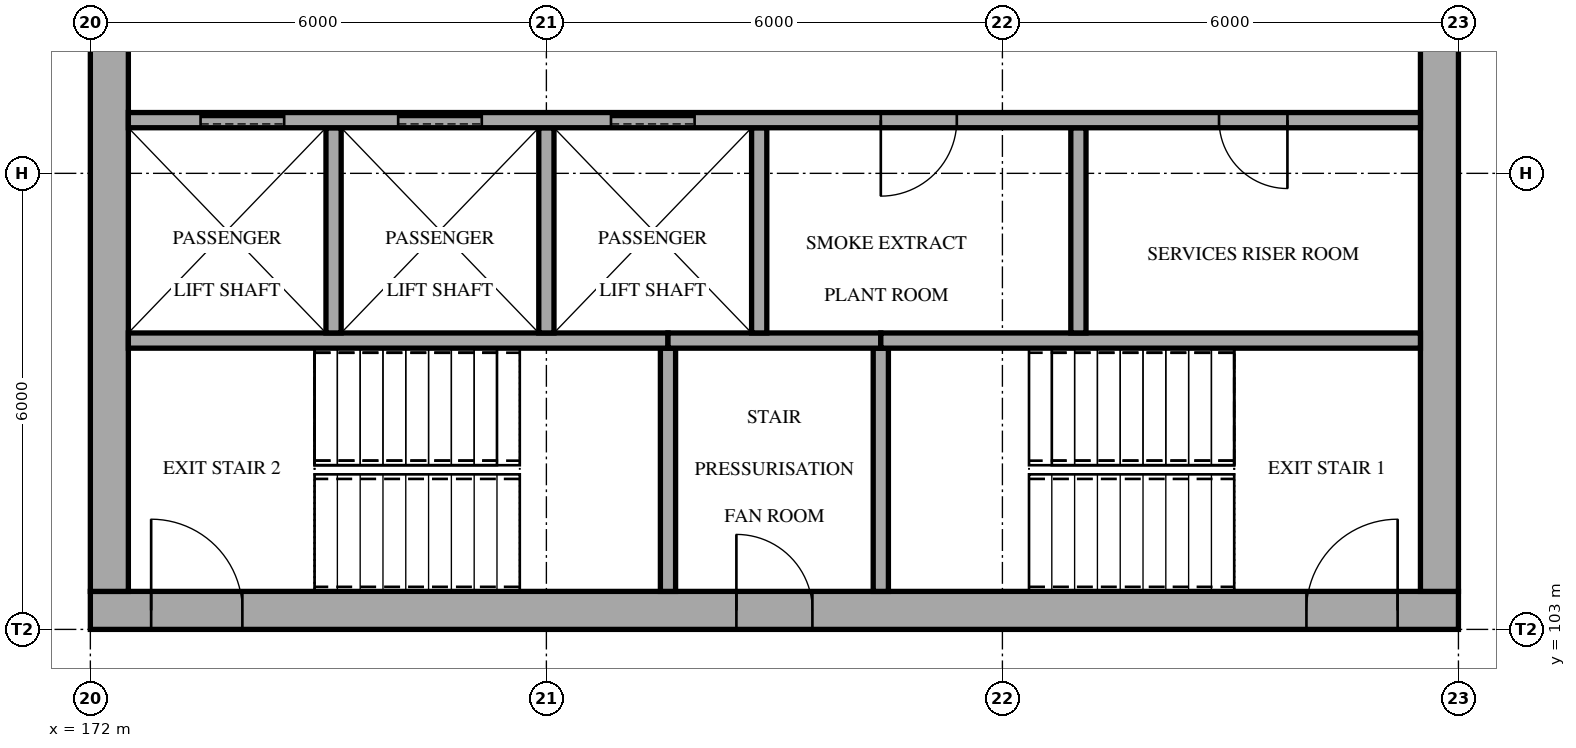
"""IFC4 building model, lengths in metres.
Left out: names, types, materials, properties, quantities, classifications, styles, units other than length and angle.
Written with IfcOpenShell. Run it as: python <this file> out.ifc"""

import sys

from ifc_helpers import new_model, si_unit, direction, frame, frame_2d, origin, place, context, subcontext, project, spatial, rectangle, extrude, element, fill, save


model = new_model("IFC4")
c1 = context("Model", 3, precision=1e-05, world=origin(), true_north=direction((0.0, 1.0)))
c2 = subcontext(c1, "Body", "Model", "MODEL_VIEW")
j1 = project(units=[si_unit("LENGTHUNIT", "METRE"), si_unit("PLANEANGLEUNIT", "RADIAN")], contexts=[c1])
p1 = place(None, origin())
s1 = spatial("IfcSite", under=j1, at=p1, CompositionType="ELEMENT")
p2 = place(p1, origin())
s2 = spatial("IfcBuilding", under=s1, at=p2, CompositionType="ELEMENT")
p3 = place(p2, frame((0.0, 0.0, -4.2)))
s3 = spatial("IfcBuildingStorey", under=s2, at=p3, CompositionType="ELEMENT", Elevation=-4.2)
p4 = place(p3, frame((172.0, 103.25, 0.0), z_axis=(0.0, 0.0, 1.0), x_axis=(1.0, 0.0, 0.0)))
e1 = element("IfcWall", 1, at=p4, inside=s3, PredefinedType="SHEAR", context=c2, shape_type="SweptSolid", body=[
    extrude(rectangle(XDim=18.0, YDim=0.5, at=frame_2d((9.0, 0.0))), origin(), (0.0, 0.0, 1.0), 4.2),
])
p5 = place(p4, frame((8.5, 0.0, 0.0)))
e2 = element("IfcOpeningElement", 2, at=p5, cuts=e1, PredefinedType="OPENING", context=c2, shape_type="SweptSolid", body=[
    extrude(rectangle(XDim=1.0, YDim=2.1, at=frame_2d((0.5, 1.05))), frame((0.0, 0.26, 0.0), z_axis=(0.0, -1.0, 0.0), x_axis=(1.0, 0.0, 0.0)), (0.0, 0.0, 1.0), 0.52),
])
p6 = place(p4, frame((0.8, 0.0, 0.0)))
e3 = element("IfcOpeningElement", 3, at=p6, cuts=e1, PredefinedType="OPENING", context=c2, shape_type="SweptSolid", body=[
    extrude(rectangle(XDim=1.2, YDim=2.1, at=frame_2d((0.6, 1.05))), frame((0.0, 0.26, 0.0), z_axis=(0.0, -1.0, 0.0), x_axis=(1.0, 0.0, 0.0)), (0.0, 0.0, 1.0), 0.52),
])
p7 = place(p4, frame((16.0, 0.0, 0.0)))
e4 = element("IfcOpeningElement", 4, at=p7, cuts=e1, PredefinedType="OPENING", context=c2, shape_type="SweptSolid", body=[
    extrude(rectangle(XDim=1.2, YDim=2.1, at=frame_2d((0.6, 1.05))), frame((0.0, 0.26, 0.0), z_axis=(0.0, -1.0, 0.0), x_axis=(1.0, 0.0, 0.0)), (0.0, 0.0, 1.0), 0.52),
])
p8 = place(p3, frame((172.25, 103.5, 0.0), z_axis=(0.0, 0.0, 1.0), x_axis=(0.0, 1.0, 0.0)))
e5 = element("IfcWall", 5, at=p8, inside=s3, PredefinedType="SHEAR", context=c2, shape_type="SweptSolid", body=[
    extrude(rectangle(XDim=17.0, YDim=0.5, at=frame_2d((8.5, 0.0))), origin(), (0.0, 0.0, 1.0), 4.2),
])
p9 = place(p8, frame((7.2, 0.0, 0.0)))
e6 = element("IfcOpeningElement", 6, at=p9, cuts=e5, PredefinedType="OPENING", context=c2, shape_type="SweptSolid", body=[
    extrude(rectangle(XDim=1.4, YDim=2.1, at=frame_2d((0.7, 1.05))), frame((0.0, 0.26, 0.0), z_axis=(0.0, -1.0, 0.0), x_axis=(1.0, 0.0, 0.0)), (0.0, 0.0, 1.0), 0.52),
])
p10 = place(p3, frame((189.75, 103.5, 0.0), z_axis=(0.0, 0.0, 1.0), x_axis=(0.0, 1.0, 0.0)))
e7 = element("IfcWall", 7, at=p10, inside=s3, PredefinedType="SHEAR", context=c2, shape_type="SweptSolid", body=[
    extrude(rectangle(XDim=17.0, YDim=0.5, at=frame_2d((8.5, 0.0))), origin(), (0.0, 0.0, 1.0), 4.2),
])
p11 = place(p10, frame((7.2, 0.0, 0.0)))
e8 = element("IfcOpeningElement", 8, at=p11, cuts=e7, PredefinedType="OPENING", context=c2, shape_type="SweptSolid", body=[
    extrude(rectangle(XDim=1.4, YDim=2.1, at=frame_2d((0.7, 1.05))), frame((0.0, 0.26, 0.0), z_axis=(0.0, -1.0, 0.0), x_axis=(1.0, 0.0, 0.0)), (0.0, 0.0, 1.0), 0.52),
])
for number, where, z_axis, x_axis in (
    (9, (179.6, 103.5, 0.0), (0.0, 0.0, 1.0), (0.0, 1.0, 0.0)),
    (10, (182.4, 103.5, 0.0), (0.0, 0.0, 1.0), (0.0, 1.0, 0.0)),
):
    element("IfcWall", number, at=place(p3, frame(where, z_axis=z_axis, x_axis=x_axis)), inside=s3, PredefinedType="SOLIDWALL", context=c2, shape_type="SweptSolid", body=[
        extrude(rectangle(XDim=3.2, YDim=0.2, at=frame_2d((1.6, 0.0))), origin(), (0.0, 0.0, 1.0), 4.0),
    ])
p12 = place(p3, frame((172.5, 106.8, 0.0), z_axis=(0.0, 0.0, 1.0), x_axis=(1.0, 0.0, 0.0)))
e11 = element("IfcWall", 11, at=p12, inside=s3, PredefinedType="SOLIDWALL", context=c2, shape_type="SweptSolid", body=[
    extrude(rectangle(XDim=7.1, YDim=0.2, at=frame_2d((3.55, 0.0))), origin(), (0.0, 0.0, 1.0), 4.0),
])
p13 = place(p3, frame((179.6, 106.8, 0.0), z_axis=(0.0, 0.0, 1.0), x_axis=(1.0, 0.0, 0.0)))
e12 = element("IfcWall", 12, at=p13, inside=s3, PredefinedType="SOLIDWALL", context=c2, shape_type="SweptSolid", body=[
    extrude(rectangle(XDim=2.8, YDim=0.2, at=frame_2d((1.4, 0.0))), origin(), (0.0, 0.0, 1.0), 4.0),
])
p14 = place(p3, frame((182.4, 106.8, 0.0), z_axis=(0.0, 0.0, 1.0), x_axis=(1.0, 0.0, 0.0)))
e13 = element("IfcWall", 13, at=p14, inside=s3, PredefinedType="SOLIDWALL", context=c2, shape_type="SweptSolid", body=[
    extrude(rectangle(XDim=7.1, YDim=0.2, at=frame_2d((3.55, 0.0))), origin(), (0.0, 0.0, 1.0), 4.0),
])
for number, where, z_axis, x_axis in (
    (14, (175.2, 106.9, 0.0), (0.0, 0.0, 1.0), (0.0, 1.0, 0.0)),
    (15, (178.0, 106.9, 0.0), (0.0, 0.0, 1.0), (0.0, 1.0, 0.0)),
    (16, (180.8, 106.9, 0.0), (0.0, 0.0, 1.0), (0.0, 1.0, 0.0)),
    (17, (185.0, 106.9, 0.0), (0.0, 0.0, 1.0), (0.0, 1.0, 0.0)),
):
    element("IfcWall", number, at=place(p3, frame(where, z_axis=z_axis, x_axis=x_axis)), inside=s3, PredefinedType="SOLIDWALL", context=c2, shape_type="SweptSolid", body=[
        extrude(rectangle(XDim=2.7, YDim=0.2, at=frame_2d((1.35, 0.0))), origin(), (0.0, 0.0, 1.0), 4.0),
    ])
p15 = place(p3, frame((172.5, 109.7, 0.0), z_axis=(0.0, 0.0, 1.0), x_axis=(1.0, 0.0, 0.0)))
e18 = element("IfcWall", 18, at=p15, inside=s3, PredefinedType="SOLIDWALL", context=c2, shape_type="SweptSolid", body=[
    extrude(rectangle(XDim=17.0, YDim=0.2, at=frame_2d((8.5, 0.0))), origin(), (0.0, 0.0, 1.0), 4.0),
])
p16 = place(p15, frame((0.95, 0.0, 0.0)))
e19 = element("IfcOpeningElement", 19, at=p16, cuts=e18, PredefinedType="OPENING", context=c2, shape_type="SweptSolid", body=[
    extrude(rectangle(XDim=1.1, YDim=2.1, at=frame_2d((0.55, 1.05))), frame((0.0, 0.11, 0.0), z_axis=(0.0, -1.0, 0.0), x_axis=(1.0, 0.0, 0.0)), (0.0, 0.0, 1.0), 0.22),
])
p17 = place(p15, frame((3.55, 0.0, 0.0)))
e20 = element("IfcOpeningElement", 20, at=p17, cuts=e18, PredefinedType="OPENING", context=c2, shape_type="SweptSolid", body=[
    extrude(rectangle(XDim=1.1, YDim=2.1, at=frame_2d((0.55, 1.05))), frame((0.0, 0.11, 0.0), z_axis=(0.0, -1.0, 0.0), x_axis=(1.0, 0.0, 0.0)), (0.0, 0.0, 1.0), 0.22),
])
p18 = place(p15, frame((6.35, 0.0, 0.0)))
e21 = element("IfcOpeningElement", 21, at=p18, cuts=e18, PredefinedType="OPENING", context=c2, shape_type="SweptSolid", body=[
    extrude(rectangle(XDim=1.1, YDim=2.1, at=frame_2d((0.55, 1.05))), frame((0.0, 0.11, 0.0), z_axis=(0.0, -1.0, 0.0), x_axis=(1.0, 0.0, 0.0)), (0.0, 0.0, 1.0), 0.22),
])
p19 = place(p15, frame((9.9, 0.0, 0.0)))
e22 = element("IfcOpeningElement", 22, at=p19, cuts=e18, PredefinedType="OPENING", context=c2, shape_type="SweptSolid", body=[
    extrude(rectangle(XDim=1.0, YDim=2.1, at=frame_2d((0.5, 1.05))), frame((0.0, 0.11, 0.0), z_axis=(0.0, -1.0, 0.0), x_axis=(1.0, 0.0, 0.0)), (0.0, 0.0, 1.0), 0.22),
])
p20 = place(p15, frame((14.35, 0.0, 0.0)))
e23 = element("IfcOpeningElement", 23, at=p20, cuts=e18, PredefinedType="OPENING", context=c2, shape_type="SweptSolid", body=[
    extrude(rectangle(XDim=0.9, YDim=2.1, at=frame_2d((0.45, 1.05))), frame((0.0, 0.11, 0.0), z_axis=(0.0, -1.0, 0.0), x_axis=(1.0, 0.0, 0.0)), (0.0, 0.0, 1.0), 0.22),
])
p21 = place(p5, origin())
e24 = element("IfcDoor", 24, at=p21, inside=s3, OperationType="SINGLE_SWING_LEFT", PredefinedType="DOOR", context=c2, shape_type="SweptSolid", body=[
    extrude(rectangle(XDim=1.0, YDim=2.1, at=frame_2d((0.5, 1.05))), frame((0.0, 0.025, 0.0), z_axis=(0.0, -1.0, 0.0), x_axis=(1.0, 0.0, 0.0)), (0.0, 0.0, 1.0), 0.05),
])
fill(e2, e24)
p22 = place(p16, origin())
e25 = element("IfcDoor", 25, at=p22, inside=s3, OperationType="SLIDING_TO_LEFT", PredefinedType="DOOR", context=c2, shape_type="SweptSolid", body=[
    extrude(rectangle(XDim=1.1, YDim=2.1, at=frame_2d((0.55, 1.05))), frame((0.0, 0.025, 0.0), z_axis=(0.0, -1.0, 0.0), x_axis=(1.0, 0.0, 0.0)), (0.0, 0.0, 1.0), 0.05),
])
fill(e19, e25)
p23 = place(p17, origin())
e26 = element("IfcDoor", 26, at=p23, inside=s3, OperationType="SLIDING_TO_LEFT", PredefinedType="DOOR", context=c2, shape_type="SweptSolid", body=[
    extrude(rectangle(XDim=1.1, YDim=2.1, at=frame_2d((0.55, 1.05))), frame((0.0, 0.025, 0.0), z_axis=(0.0, -1.0, 0.0), x_axis=(1.0, 0.0, 0.0)), (0.0, 0.0, 1.0), 0.05),
])
fill(e20, e26)
p24 = place(p18, origin())
e27 = element("IfcDoor", 27, at=p24, inside=s3, OperationType="SLIDING_TO_LEFT", PredefinedType="DOOR", context=c2, shape_type="SweptSolid", body=[
    extrude(rectangle(XDim=1.1, YDim=2.1, at=frame_2d((0.55, 1.05))), frame((0.0, 0.025, 0.0), z_axis=(0.0, -1.0, 0.0), x_axis=(1.0, 0.0, 0.0)), (0.0, 0.0, 1.0), 0.05),
])
fill(e21, e27)
p25 = place(p19, frame((1.0, 0.0, 0.0), z_axis=(0.0, 0.0, 1.0), x_axis=(-1.0, 0.0, 0.0)))
e28 = element("IfcDoor", 28, at=p25, inside=s3, OperationType="SINGLE_SWING_RIGHT", PredefinedType="DOOR", context=c2, shape_type="SweptSolid", body=[
    extrude(rectangle(XDim=1.0, YDim=2.1, at=frame_2d((0.5, 1.05))), frame((0.0, 0.025, 0.0), z_axis=(0.0, -1.0, 0.0), x_axis=(1.0, 0.0, 0.0)), (0.0, 0.0, 1.0), 0.05),
])
fill(e22, e28)
p26 = place(p20, frame((0.9, 0.0, 0.0), z_axis=(0.0, 0.0, 1.0), x_axis=(-1.0, 0.0, 0.0)))
e29 = element("IfcDoor", 29, at=p26, inside=s3, OperationType="SINGLE_SWING_LEFT", PredefinedType="DOOR", context=c2, shape_type="SweptSolid", body=[
    extrude(rectangle(XDim=0.9, YDim=2.1, at=frame_2d((0.45, 1.05))), frame((0.0, 0.025, 0.0), z_axis=(0.0, -1.0, 0.0), x_axis=(1.0, 0.0, 0.0)), (0.0, 0.0, 1.0), 0.05),
])
fill(e23, e29)
p27 = place(p6, origin())
e30 = element("IfcDoor", 30, at=p27, inside=s3, OperationType="SINGLE_SWING_LEFT", PredefinedType="DOOR", context=c2, shape_type="SweptSolid", body=[
    extrude(rectangle(XDim=1.2, YDim=2.1, at=frame_2d((0.6, 1.05))), frame((0.0, 0.025, 0.0), z_axis=(0.0, -1.0, 0.0), x_axis=(1.0, 0.0, 0.0)), (0.0, 0.0, 1.0), 0.05),
])
fill(e3, e30)
p28 = place(p7, origin())
e31 = element("IfcDoor", 31, at=p28, inside=s3, OperationType="SINGLE_SWING_RIGHT", PredefinedType="DOOR", context=c2, shape_type="SweptSolid", body=[
    extrude(rectangle(XDim=1.2, YDim=2.1, at=frame_2d((0.6, 1.05))), frame((0.0, 0.025, 0.0), z_axis=(0.0, -1.0, 0.0), x_axis=(1.0, 0.0, 0.0)), (0.0, 0.0, 1.0), 0.05),
])
fill(e4, e31)
save(model, sys.argv[1])
